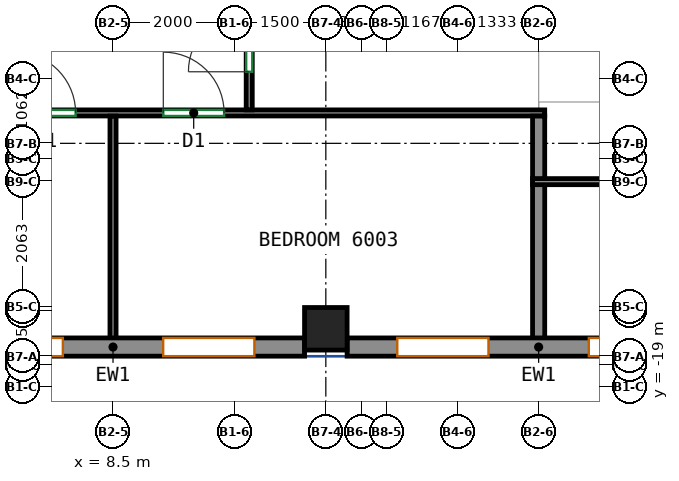
"""IFC4 building model, lengths in metres.
Left out: names, types, materials, properties, quantities, classifications, styles, units other than length and angle.
Written with IfcOpenShell. Run it as: python <this file> out.ifc"""

import sys

from ifc_helpers import new_model, si_unit, direction, frame, frame_2d, origin, origin_2d, place, context, subcontext, project, spatial, rectangle, extrude, source, transform, mapped, element, fill, save


model = new_model("IFC4")
c1 = context("Model", 3, precision=1e-05, world=origin(), true_north=direction((0.0, 1.0)))
c2 = subcontext(c1, "Body", "Model", "MODEL_VIEW")
j1 = project(units=[si_unit("LENGTHUNIT", "METRE"), si_unit("PLANEANGLEUNIT", "RADIAN")], contexts=[c1])
p1 = place(None, origin())
s1 = spatial("IfcSite", under=j1, at=p1, CompositionType="ELEMENT")
p2 = place(p1, origin())
s2 = spatial("IfcBuilding", under=s1, at=p2, CompositionType="ELEMENT")
p3 = place(p2, frame((0.0, 0.0, 249.2)))
s3 = spatial("IfcBuildingStorey", under=s2, at=p3, CompositionType="ELEMENT", Elevation=249.2)
m1 = source(origin(), c2, "Body", "SweptSolid", [
    extrude(rectangle(XDim=0.7, YDim=0.7, at=origin_2d()), origin(), (0.0, 0.0, 1.0), 3.12),
])
p4 = place(p3, frame((12.0, -18.05, 0.0), z_axis=(0.0, 0.0, 1.0), x_axis=(1.0, 0.0, 0.0)))
e1 = element("IfcColumn", 1, at=p4, inside=s3, PredefinedType="COLUMN", context=c2, shape_type="MappedRepresentation", body=[
    mapped(m1, transform((0.0, 0.0, 0.0))),
])
m2 = source(origin(), c2, "Body", "SweptSolid", [
    extrude(rectangle(XDim=6.3, YDim=0.3, at=frame_2d((3.15, 0.0))), origin(), (0.0, 0.0, 1.0), 3.12),
])
p5 = place(p3, frame((5.35, -18.35, 0.0), z_axis=(0.0, 0.0, 1.0), x_axis=(1.0, 0.0, 0.0)))
e2 = element("IfcWall", 2, at=p5, inside=s3, PredefinedType="SOLIDWALL", context=c2, shape_type="MappedRepresentation", body=[
    mapped(m2, transform((0.0, 0.0, 0.0))),
])
p6 = place(p5, frame((0.825, 0.0, 0.8)))
e3 = element("IfcOpeningElement", 3, at=p6, cuts=e2, PredefinedType="OPENING", context=c2, shape_type="SweptSolid", body=[
    extrude(rectangle(XDim=1.5, YDim=2.05, at=frame_2d((0.75, 1.025))), frame((0.0, 0.16, 0.0), z_axis=(0.0, -1.0, 0.0), x_axis=(1.0, 0.0, 0.0)), (0.0, 0.0, 1.0), 0.32),
])
p7 = place(p5, frame((3.975, 0.0, 0.8)))
e4 = element("IfcOpeningElement", 4, at=p7, cuts=e2, PredefinedType="OPENING", context=c2, shape_type="SweptSolid", body=[
    extrude(rectangle(XDim=1.5, YDim=2.05, at=frame_2d((0.75, 1.025))), frame((0.0, 0.16, 0.0), z_axis=(0.0, -1.0, 0.0), x_axis=(1.0, 0.0, 0.0)), (0.0, 0.0, 1.0), 0.32),
])
p8 = place(p3, frame((12.35, -18.35, 0.0), z_axis=(0.0, 0.0, 1.0), x_axis=(1.0, 0.0, 0.0)))
e5 = element("IfcWall", 5, at=p8, inside=s3, PredefinedType="SOLIDWALL", context=c2, shape_type="MappedRepresentation", body=[
    mapped(m2, transform((0.0, 0.0, 0.0))),
])
p9 = place(p8, frame((0.825, 0.0, 0.8)))
e6 = element("IfcOpeningElement", 6, at=p9, cuts=e5, PredefinedType="OPENING", context=c2, shape_type="SweptSolid", body=[
    extrude(rectangle(XDim=1.5, YDim=2.05, at=frame_2d((0.75, 1.025))), frame((0.0, 0.16, 0.0), z_axis=(0.0, -1.0, 0.0), x_axis=(1.0, 0.0, 0.0)), (0.0, 0.0, 1.0), 0.32),
])
p10 = place(p8, frame((3.975, 0.0, 0.8)))
e7 = element("IfcOpeningElement", 7, at=p10, cuts=e5, PredefinedType="OPENING", context=c2, shape_type="SweptSolid", body=[
    extrude(rectangle(XDim=1.5, YDim=2.05, at=frame_2d((0.75, 1.025))), frame((0.0, 0.16, 0.0), z_axis=(0.0, -1.0, 0.0), x_axis=(1.0, 0.0, 0.0)), (0.0, 0.0, 1.0), 0.32),
])
p11 = place(p3, frame((-9.06, -14.5, 0.0), z_axis=(0.0, 0.0, 1.0), x_axis=(1.0, 0.0, 0.0)))
e8 = element("IfcWall", 8, at=p11, inside=s3, PredefinedType="PARTITIONING", context=c2, shape_type="SweptSolid", body=[
    extrude(rectangle(XDim=24.66, YDim=0.1, at=frame_2d((12.33, 0.0))), origin(), (0.0, 0.0, 1.0), 3.12),
])
p12 = place(p11, frame((0.924, 0.0, 0.0)))
e9 = element("IfcOpeningElement", 9, at=p12, cuts=e8, PredefinedType="OPENING", context=c2, shape_type="SweptSolid", body=[
    extrude(rectangle(XDim=1.0, YDim=2.1, at=frame_2d((0.5, 1.05))), frame((0.0, 0.06, 0.0), z_axis=(0.0, -1.0, 0.0), x_axis=(1.0, 0.0, 0.0)), (0.0, 0.0, 1.0), 0.12),
])
p13 = place(p11, frame((15.945, 0.0, 0.0)))
e10 = element("IfcOpeningElement", 10, at=p13, cuts=e8, PredefinedType="OPENING", context=c2, shape_type="SweptSolid", body=[
    extrude(rectangle(XDim=1.0, YDim=2.1, at=frame_2d((0.5, 1.05))), frame((0.0, 0.06, 0.0), z_axis=(0.0, -1.0, 0.0), x_axis=(1.0, 0.0, 0.0)), (0.0, 0.0, 1.0), 0.12),
])
p14 = place(p11, frame((18.387, 0.0, 0.0)))
e11 = element("IfcOpeningElement", 11, at=p14, cuts=e8, PredefinedType="OPENING", context=c2, shape_type="SweptSolid", body=[
    extrude(rectangle(XDim=1.0, YDim=2.1, at=frame_2d((0.5, 1.05))), frame((0.0, 0.06, 0.0), z_axis=(0.0, -1.0, 0.0), x_axis=(1.0, 0.0, 0.0)), (0.0, 0.0, 1.0), 0.12),
])
p15 = place(p3, frame((10.74, -14.45, 0.0), z_axis=(0.0, 0.0, 1.0), x_axis=(0.0, 1.0, 0.0)))
e12 = element("IfcWall", 12, at=p15, inside=s3, PredefinedType="PARTITIONING", context=c2, shape_type="SweptSolid", body=[
    extrude(rectangle(XDim=2.573, YDim=0.1, at=frame_2d((1.287, 0.0))), origin(), (0.0, 0.0, 1.0), 3.12),
])
p16 = place(p15, frame((0.627, 0.0, 0.0)))
e13 = element("IfcOpeningElement", 13, at=p16, cuts=e12, PredefinedType="OPENING", context=c2, shape_type="SweptSolid", body=[
    extrude(rectangle(XDim=1.0, YDim=2.1, at=frame_2d((0.5, 1.05))), frame((0.0, 0.06, 0.0), z_axis=(0.0, -1.0, 0.0), x_axis=(1.0, 0.0, 0.0)), (0.0, 0.0, 1.0), 0.12),
])
p17 = place(p3, frame((8.5, -18.25, 0.0), z_axis=(0.0, 0.0, 1.0), x_axis=(0.0, 1.0, 0.0)))
e14 = element("IfcWall", 14, at=p17, inside=s3, PredefinedType="PARTITIONING", context=c2, shape_type="SweptSolid", body=[
    extrude(rectangle(XDim=3.698, YDim=0.1, at=frame_2d((1.849, 0.0))), origin(), (0.0, 0.0, 1.0), 3.12),
])
p18 = place(p3, frame((15.5, -18.25, 0.0), z_axis=(0.0, 0.0, 1.0), x_axis=(0.0, 1.0, 0.0)))
e15 = element("IfcWall", 15, at=p18, inside=s3, PredefinedType="PARTITIONING", context=c2, shape_type="SweptSolid", body=[
    extrude(rectangle(XDim=2.58, YDim=0.2, at=frame_2d((1.29, 0.0))), origin(), (0.0, 0.0, 1.0), 3.12),
])
p19 = place(p3, frame((15.5, -15.59, 0.0), z_axis=(0.0, 0.0, 1.0), x_axis=(0.0, 1.0, 0.0)))
e16 = element("IfcWall", 16, at=p19, inside=s3, PredefinedType="PARTITIONING", context=c2, shape_type="SweptSolid", body=[
    extrude(rectangle(XDim=1.038, YDim=0.2, at=frame_2d((0.519, 0.0))), origin(), (0.0, 0.0, 1.0), 3.12),
])
p20 = place(p3, frame((15.4, -15.63, 0.0), z_axis=(0.0, 0.0, 1.0), x_axis=(1.0, 0.0, 0.0)))
e17 = element("IfcWall", 17, at=p20, inside=s3, PredefinedType="PARTITIONING", context=c2, shape_type="SweptSolid", body=[
    extrude(rectangle(XDim=2.4, YDim=0.1, at=frame_2d((1.2, 0.0))), origin(), (0.0, 0.0, 1.0), 3.12),
])
p21 = place(p6, origin())
e18 = element("IfcWindow", 18, at=p21, inside=s3, PartitioningType="SINGLE_PANEL", PredefinedType="WINDOW", context=c2, shape_type="SweptSolid", body=[
    extrude(rectangle(XDim=1.5, YDim=2.05, at=frame_2d((0.75, 1.025))), frame((0.0, 0.03, 0.0), z_axis=(0.0, -1.0, 0.0), x_axis=(1.0, 0.0, 0.0)), (0.0, 0.0, 1.0), 0.06),
])
fill(e3, e18)
p22 = place(p7, origin())
e19 = element("IfcWindow", 19, at=p22, inside=s3, PartitioningType="SINGLE_PANEL", PredefinedType="WINDOW", context=c2, shape_type="SweptSolid", body=[
    extrude(rectangle(XDim=1.5, YDim=2.05, at=frame_2d((0.75, 1.025))), frame((0.0, 0.03, 0.0), z_axis=(0.0, -1.0, 0.0), x_axis=(1.0, 0.0, 0.0)), (0.0, 0.0, 1.0), 0.06),
])
fill(e4, e19)
p23 = place(p9, origin())
e20 = element("IfcWindow", 20, at=p23, inside=s3, PartitioningType="SINGLE_PANEL", PredefinedType="WINDOW", context=c2, shape_type="SweptSolid", body=[
    extrude(rectangle(XDim=1.5, YDim=2.05, at=frame_2d((0.75, 1.025))), frame((0.0, 0.03, 0.0), z_axis=(0.0, -1.0, 0.0), x_axis=(1.0, 0.0, 0.0)), (0.0, 0.0, 1.0), 0.06),
])
fill(e6, e20)
p24 = place(p10, origin())
e21 = element("IfcWindow", 21, at=p24, inside=s3, PartitioningType="SINGLE_PANEL", PredefinedType="WINDOW", context=c2, shape_type="SweptSolid", body=[
    extrude(rectangle(XDim=1.5, YDim=2.05, at=frame_2d((0.75, 1.025))), frame((0.0, 0.03, 0.0), z_axis=(0.0, -1.0, 0.0), x_axis=(1.0, 0.0, 0.0)), (0.0, 0.0, 1.0), 0.06),
])
fill(e7, e21)
p25 = place(p13, origin())
e22 = element("IfcDoor", 22, at=p25, inside=s3, OperationType="SINGLE_SWING_LEFT", PredefinedType="DOOR", context=c2, shape_type="SweptSolid", body=[
    extrude(rectangle(XDim=1.0, YDim=2.1, at=frame_2d((0.5, 1.05))), frame((0.0, 0.025, 0.0), z_axis=(0.0, -1.0, 0.0), x_axis=(1.0, 0.0, 0.0)), (0.0, 0.0, 1.0), 0.05),
])
fill(e10, e22)
p26 = place(p14, origin())
e23 = element("IfcDoor", 23, at=p26, inside=s3, OperationType="SINGLE_SWING_LEFT", PredefinedType="DOOR", context=c2, shape_type="SweptSolid", body=[
    extrude(rectangle(XDim=1.0, YDim=2.1, at=frame_2d((0.5, 1.05))), frame((0.0, 0.025, 0.0), z_axis=(0.0, -1.0, 0.0), x_axis=(1.0, 0.0, 0.0)), (0.0, 0.0, 1.0), 0.05),
])
fill(e11, e23)
p27 = place(p16, origin())
e24 = element("IfcDoor", 24, at=p27, inside=s3, OperationType="SINGLE_SWING_LEFT", PredefinedType="DOOR", context=c2, shape_type="SweptSolid", body=[
    extrude(rectangle(XDim=1.0, YDim=2.1, at=frame_2d((0.5, 1.05))), frame((0.0, 0.025, 0.0), z_axis=(0.0, -1.0, 0.0), x_axis=(1.0, 0.0, 0.0)), (0.0, 0.0, 1.0), 0.05),
])
fill(e13, e24)
save(model, sys.argv[1])
